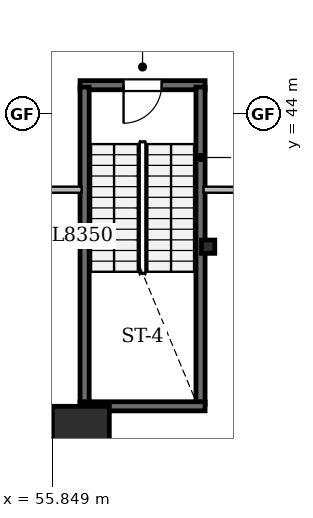
"""IFC4 building model, lengths in metres.
Left out: names, types, materials, properties, quantities, classifications, styles, units other than length and angle.
Written with IfcOpenShell. Run it as: python <this file> out.ifc"""

import sys

from ifc_helpers import new_model, si_unit, direction, frame, frame_2d, origin, origin_2d, place, context, subcontext, project, spatial, rectangle, i_section, extrude, element, fill, save


model = new_model("IFC4")
c1 = context("Model", 3, precision=1e-05, world=origin(), true_north=direction((0.0, 1.0)))
c2 = subcontext(c1, "Body", "Model", "MODEL_VIEW")
j1 = project(units=[si_unit("LENGTHUNIT", "METRE"), si_unit("PLANEANGLEUNIT", "RADIAN")], contexts=[c1])
p1 = place(None, origin())
s1 = spatial("IfcSite", under=j1, at=p1, CompositionType="ELEMENT")
p2 = place(p1, origin())
s2 = spatial("IfcBuilding", under=s1, at=p2, CompositionType="ELEMENT")
p3 = place(p2, frame((0.0, 0.0, 4.8)))
s3 = spatial("IfcBuildingStorey", under=s2, at=p3, CompositionType="ELEMENT", Elevation=4.8)
p4 = place(p3, frame((56.6, 35.8, 0.0), z_axis=(0.0, 0.0, 1.0), x_axis=(1.0, 0.0, 0.0)))
e1 = element("IfcColumn", 1, at=p4, inside=s3, PredefinedType="COLUMN", context=c2, shape_type="SweptSolid", body=[
    extrude(rectangle(XDim=1.5, YDim=1.0, at=origin_2d()), origin(), (0.0, 0.0, 1.0), 4.8),
])
p5 = place(p3, frame((59.95, 40.5, 0.0), z_axis=(0.0, 0.0, 1.0), x_axis=(1.0, 0.0, 0.0)))
e2 = element("IfcColumn", 2, at=p5, inside=s3, PredefinedType="PILASTER", context=c2, shape_type="SweptSolid", body=[
    extrude(i_section(OverallWidth=0.35, OverallDepth=0.35, WebThickness=0.012, FlangeThickness=0.019, FilletRadius=0.02, at=origin_2d()), origin(), (0.0, 0.0, 1.0), 4.8),
])
p6 = place(p3, frame((56.58, 44.75, 0.0), z_axis=(0.0, 0.0, 1.0), x_axis=(1.0, 0.0, 0.0)))
e3 = element("IfcWall", 3, at=p6, inside=s3, PredefinedType="SHEAR", context=c2, shape_type="SweptSolid", body=[
    extrude(rectangle(XDim=3.29, YDim=0.24, at=frame_2d((1.645, 0.0))), origin(), (0.0, 0.0, 1.0), 4.5),
])
p7 = place(p6, frame((1.145, 0.0, 0.0)))
e4 = element("IfcOpeningElement", 4, at=p7, cuts=e3, PredefinedType="OPENING", context=c2, shape_type="SweptSolid", body=[
    extrude(rectangle(XDim=1.0, YDim=2.15, at=frame_2d((0.5, 1.075))), frame((0.0, 0.13, 0.0), z_axis=(0.0, -1.0, 0.0), x_axis=(1.0, 0.0, 0.0)), (0.0, 0.0, 1.0), 0.26),
])
for number, where, z_axis, x_axis in (
    (5, (56.7, 36.35, 0.0), (0.0, 0.0, 1.0), (0.0, 1.0, 0.0)),
    (6, (59.75, 36.35, 0.0), (0.0, 0.0, 1.0), (0.0, 1.0, 0.0)),
):
    element("IfcWall", number, at=place(p3, frame(where, z_axis=z_axis, x_axis=x_axis)), inside=s3, PredefinedType="SHEAR", context=c2, shape_type="SweptSolid", body=[
        extrude(rectangle(XDim=8.35, YDim=0.24, at=frame_2d((4.175, 0.0))), origin(), (0.0, 0.0, 1.0), 4.5),
    ])
p8 = place(p3, frame((56.58, 36.3, 0.0), z_axis=(0.0, 0.0, 1.0), x_axis=(1.0, 0.0, 0.0)))
e7 = element("IfcWall", 7, at=p8, inside=s3, PredefinedType="SHEAR", context=c2, shape_type="SweptSolid", body=[
    extrude(rectangle(XDim=3.29, YDim=0.24, at=frame_2d((1.645, 0.0))), origin(), (0.0, 0.0, 1.0), 4.5),
])
p9 = place(p3, frame((72.873, 41.958, 0.0), z_axis=(0.0, 0.0, 1.0), x_axis=(-0.999994817364, 0.003219510119, 0.0)))
e8 = element("IfcWall", 8, at=p9, inside=s3, PredefinedType="SOLIDWALL", context=c2, shape_type="SweptSolid", body=[
    extrude(rectangle(XDim=13.043, YDim=0.16, at=frame_2d((6.521, 0.0))), origin(), (0.0, 0.0, 1.0), 3.788),
])
p10 = place(p3, frame((56.62, 42.0, 0.0), z_axis=(0.0, 0.0, 1.0), x_axis=(-1.0, 0.0, 0.0)))
e9 = element("IfcWall", 9, at=p10, inside=s3, PredefinedType="SOLIDWALL", context=c2, shape_type="SweptSolid", body=[
    extrude(rectangle(XDim=1.94, YDim=0.16, at=frame_2d((0.97, 0.0))), origin(), (0.0, 0.0, 1.0), 4.0),
])
p11 = place(p7, frame((1.0, 0.0, 0.0), z_axis=(0.0, 0.0, 1.0), x_axis=(-1.0, 0.0, 0.0)))
e10 = element("IfcDoor", 10, at=p11, inside=s3, OperationType="SINGLE_SWING_LEFT", PredefinedType="DOOR", context=c2, shape_type="SweptSolid", body=[
    extrude(rectangle(XDim=1.0, YDim=2.15, at=frame_2d((0.5, 1.075))), frame((0.0, 0.025, 0.0), z_axis=(0.0, -1.0, 0.0), x_axis=(1.0, 0.0, 0.0)), (0.0, 0.0, 1.0), 0.05),
])
fill(e4, e10)
save(model, sys.argv[1])
